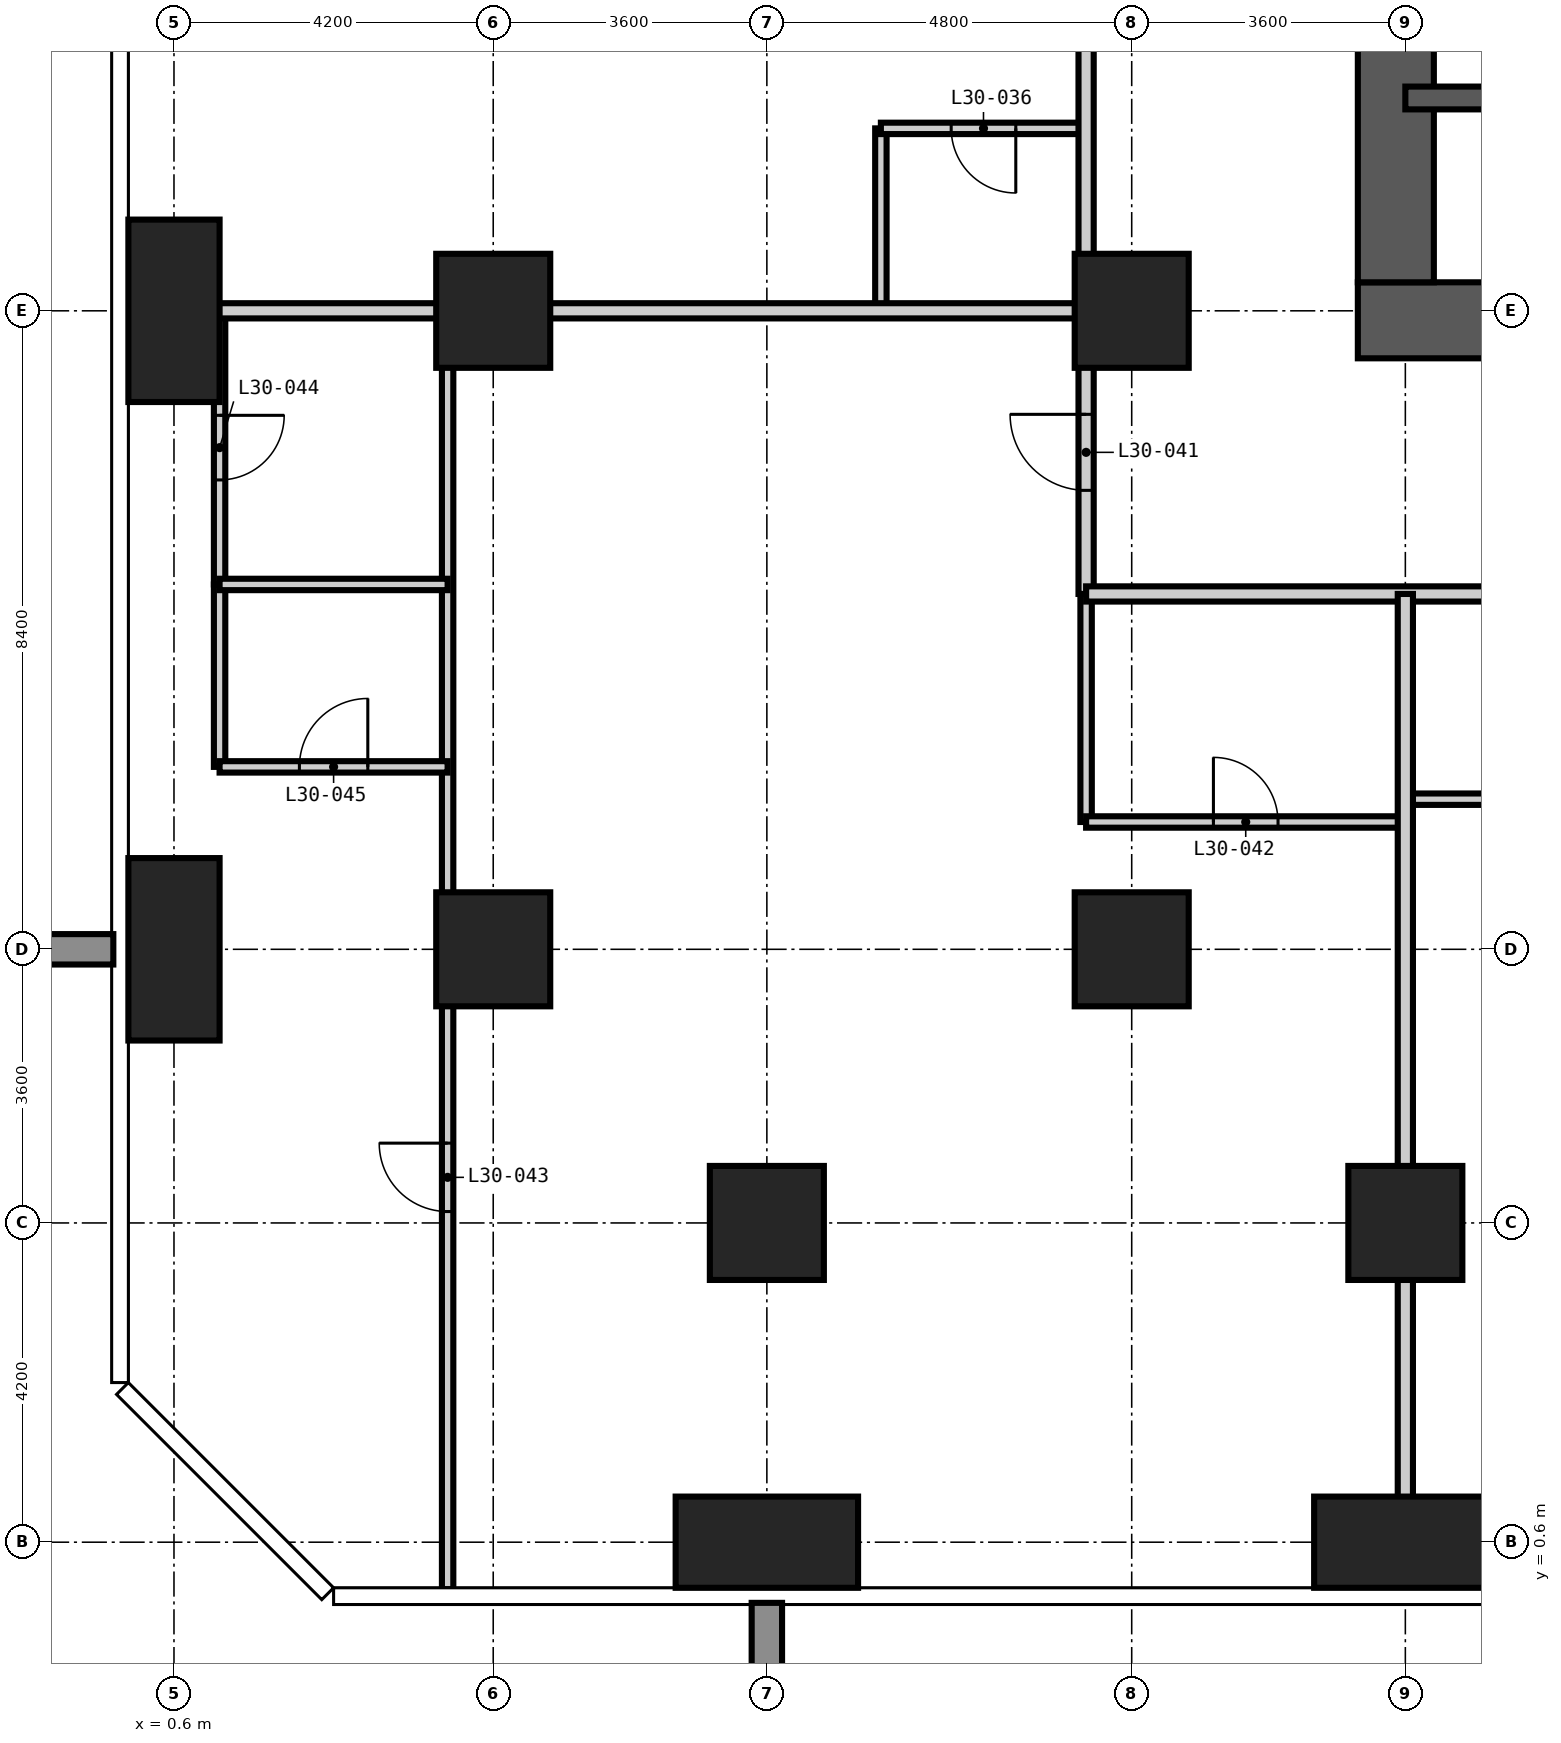
"""IFC4 building model, lengths in metres.
Left out: names, types, materials, properties, quantities, classifications, styles, units other than length and angle.
Written with IfcOpenShell. Run it as: python <this file> out.ifc"""

import sys

from ifc_helpers import new_model, si_unit, direction, frame, frame_2d, origin, origin_2d, place, context, subcontext, project, spatial, rectangle, extrude, element, fill, save


model = new_model("IFC4")
c1 = context("Model", 3, precision=1e-05, world=origin(), true_north=direction((0.0, 1.0)))
c2 = subcontext(c1, "Body", "Model", "MODEL_VIEW")
j1 = project(units=[si_unit("LENGTHUNIT", "METRE"), si_unit("PLANEANGLEUNIT", "RADIAN")], contexts=[c1])
p1 = place(None, origin())
s1 = spatial("IfcSite", under=j1, at=p1, CompositionType="ELEMENT")
p2 = place(p1, origin())
s2 = spatial("IfcBuilding", under=s1, at=p2, CompositionType="ELEMENT")
p3 = place(p2, frame((0.0, 0.0, 118.8)))
s3 = spatial("IfcBuildingStorey", under=s2, at=p3, CompositionType="ELEMENT", Elevation=118.8)
for number, where, z_axis, x_axis in (
    (1, (0.6, 8.4, -0.35), (0.0, 0.0, 1.0), (1.0, 0.0, 0.0)),
    (2, (0.6, 16.8, -0.35), (0.0, 0.0, 1.0), (1.0, 0.0, 0.0)),
):
    element("IfcColumn", number, at=place(p3, frame(where, z_axis=z_axis, x_axis=x_axis)), inside=s3, PredefinedType="COLUMN", context=c2, shape_type="SweptSolid", body=[
        extrude(rectangle(XDim=1.2, YDim=2.4, at=origin_2d()), origin(), (0.0, 0.0, 1.0), 3.6),
    ])
for number, where, z_axis, x_axis in (
    (3, (4.8, 8.4, -0.35), (0.0, 0.0, 1.0), (1.0, 0.0, 0.0)),
    (4, (4.8, 16.8, -0.35), (0.0, 0.0, 1.0), (1.0, 0.0, 0.0)),
):
    element("IfcColumn", number, at=place(p3, frame(where, z_axis=z_axis, x_axis=x_axis)), inside=s3, PredefinedType="COLUMN", context=c2, shape_type="SweptSolid", body=[
        extrude(rectangle(XDim=1.5, YDim=1.5, at=origin_2d()), origin(), (0.0, 0.0, 1.0), 3.6),
    ])
p4 = place(p3, frame((8.4, 0.6, -0.35), z_axis=(0.0, 0.0, 1.0), x_axis=(1.0, 0.0, 0.0)))
e5 = element("IfcColumn", 5, at=p4, inside=s3, PredefinedType="COLUMN", context=c2, shape_type="SweptSolid", body=[
    extrude(rectangle(XDim=2.4, YDim=1.2, at=origin_2d()), origin(), (0.0, 0.0, 1.0), 3.6),
])
for number, where, z_axis, x_axis in (
    (6, (8.4, 4.8, -0.35), (0.0, 0.0, 1.0), (1.0, 0.0, 0.0)),
    (7, (13.2, 8.4, -0.35), (0.0, 0.0, 1.0), (1.0, 0.0, 0.0)),
    (8, (13.2, 16.8, -0.35), (0.0, 0.0, 1.0), (1.0, 0.0, 0.0)),
):
    element("IfcColumn", number, at=place(p3, frame(where, z_axis=z_axis, x_axis=x_axis)), inside=s3, PredefinedType="COLUMN", context=c2, shape_type="SweptSolid", body=[
        extrude(rectangle(XDim=1.5, YDim=1.5, at=origin_2d()), origin(), (0.0, 0.0, 1.0), 3.6),
    ])
p5 = place(p3, frame((16.8, 0.6, -0.35), z_axis=(0.0, 0.0, 1.0), x_axis=(1.0, 0.0, 0.0)))
e9 = element("IfcColumn", 9, at=p5, inside=s3, PredefinedType="COLUMN", context=c2, shape_type="SweptSolid", body=[
    extrude(rectangle(XDim=2.4, YDim=1.2, at=origin_2d()), origin(), (0.0, 0.0, 1.0), 3.6),
])
p6 = place(p3, frame((16.8, 4.8, -0.35), z_axis=(0.0, 0.0, 1.0), x_axis=(1.0, 0.0, 0.0)))
e10 = element("IfcColumn", 10, at=p6, inside=s3, PredefinedType="COLUMN", context=c2, shape_type="SweptSolid", body=[
    extrude(rectangle(XDim=1.5, YDim=1.5, at=origin_2d()), origin(), (0.0, 0.0, 1.0), 3.6),
])
p7 = place(p3, frame((16.175, 16.675, -0.35), z_axis=(0.0, 0.0, 1.0), x_axis=(1.0, 0.0, 0.0)))
e11 = element("IfcWall", 11, at=p7, inside=s3, PredefinedType="SHEAR", context=c2, shape_type="SweptSolid", body=[
    extrude(rectangle(XDim=26.45, YDim=1.0, at=frame_2d((13.225, 0.0))), origin(), (0.0, 0.0, 1.0), 3.6),
])
p8 = place(p7, frame((12.725, 0.0, 0.35)))
e12 = element("IfcOpeningElement", 12, at=p8, cuts=e11, PredefinedType="OPENING", context=c2, shape_type="SweptSolid", body=[
    extrude(rectangle(XDim=1.0, YDim=2.1, at=frame_2d((0.5, 1.05))), frame((0.0, 0.51, 0.0), z_axis=(0.0, -1.0, 0.0), x_axis=(1.0, 0.0, 0.0)), (0.0, 0.0, 1.0), 1.02),
])
p9 = place(p7, frame((19.025, 0.0, 0.35)))
e13 = element("IfcOpeningElement", 13, at=p9, cuts=e11, PredefinedType="OPENING", context=c2, shape_type="SweptSolid", body=[
    extrude(rectangle(XDim=1.0, YDim=2.1, at=frame_2d((0.5, 1.05))), frame((0.0, 0.51, 0.0), z_axis=(0.0, -1.0, 0.0), x_axis=(1.0, 0.0, 0.0)), (0.0, 0.0, 1.0), 1.02),
])
p10 = place(p3, frame((16.675, 41.625, -0.35), z_axis=(0.0, 0.0, 1.0), x_axis=(0.0, -1.0, 0.0)))
e14 = element("IfcWall", 14, at=p10, inside=s3, PredefinedType="SHEAR", context=c2, shape_type="SweptSolid", body=[
    extrude(rectangle(XDim=24.45, YDim=1.0, at=frame_2d((12.225, 0.0))), origin(), (0.0, 0.0, 1.0), 3.6),
])
p11 = place(p10, frame((11.325, 0.0, 0.35)))
e15 = element("IfcOpeningElement", 15, at=p11, cuts=e14, PredefinedType="OPENING", context=c2, shape_type="SweptSolid", body=[
    extrude(rectangle(XDim=1.8, YDim=2.2, at=frame_2d((0.9, 1.1))), frame((0.0, 0.51, 0.0), z_axis=(0.0, -1.0, 0.0), x_axis=(1.0, 0.0, 0.0)), (0.0, 0.0, 1.0), 1.02),
])
p12 = place(p10, frame((20.125, 0.0, 0.35)))
e16 = element("IfcOpeningElement", 16, at=p12, cuts=e14, PredefinedType="OPENING", context=c2, shape_type="SweptSolid", body=[
    extrude(rectangle(XDim=1.0, YDim=2.1, at=frame_2d((0.5, 1.05))), frame((0.0, 0.51, 0.0), z_axis=(0.0, -1.0, 0.0), x_axis=(1.0, 0.0, 0.0)), (0.0, 0.0, 1.0), 1.02),
])
p13 = place(p10, frame((5.425, 0.0, 0.35)))
e17 = element("IfcOpeningElement", 17, at=p13, cuts=e14, PredefinedType="OPENING", context=c2, shape_type="SweptSolid", body=[
    extrude(rectangle(XDim=1.0, YDim=2.1, at=frame_2d((0.5, 1.05))), frame((0.0, 0.51, 0.0), z_axis=(0.0, -1.0, 0.0), x_axis=(1.0, 0.0, 0.0)), (0.0, 0.0, 1.0), 1.02),
])
p14 = place(p3, frame((16.8, 19.6, -0.35), z_axis=(0.0, 0.0, 1.0), x_axis=(1.0, 0.0, 0.0)))
e18 = element("IfcWall", 18, at=p14, inside=s3, PredefinedType="SHEAR", context=c2, shape_type="SweptSolid", body=[
    extrude(rectangle(XDim=8.4, YDim=0.3, at=frame_2d((4.2, 0.0))), origin(), (0.0, 0.0, 1.0), 3.6),
])
p15 = place(p3, frame((1.2, 13.2, 0.0), z_axis=(0.0, 0.0, 1.0), x_axis=(0.0, 1.0, 0.0)))
e19 = element("IfcWall", 19, at=p15, inside=s3, PredefinedType="PARTITIONING", context=c2, shape_type="SweptSolid", body=[
    extrude(rectangle(XDim=3.6, YDim=0.15, at=frame_2d((1.8, 0.0))), origin(), (0.0, 0.0, 1.0), 3.25),
])
p16 = place(p15, frame((1.375, 0.0, 0.0)))
e20 = element("IfcOpeningElement", 20, at=p16, cuts=e19, PredefinedType="OPENING", context=c2, shape_type="SweptSolid", body=[
    extrude(rectangle(XDim=0.85, YDim=2.1, at=frame_2d((0.425, 1.05))), frame((0.0, 0.085, 0.0), z_axis=(0.0, -1.0, 0.0), x_axis=(1.0, 0.0, 0.0)), (0.0, 0.0, 1.0), 0.17),
])
p17 = place(p3, frame((9.9, 16.8, 0.0), z_axis=(0.0, 0.0, 1.0), x_axis=(0.0, 1.0, 0.0)))
e21 = element("IfcWall", 21, at=p17, inside=s3, PredefinedType="PARTITIONING", context=c2, shape_type="SweptSolid", body=[
    extrude(rectangle(XDim=2.4, YDim=0.15, at=frame_2d((1.2, 0.0))), origin(), (0.0, 0.0, 1.0), 3.25),
])
p18 = place(p3, frame((12.6, 10.075, 0.0), z_axis=(0.0, 0.0, 1.0), x_axis=(0.0, 1.0, 0.0)))
e22 = element("IfcWall", 22, at=p18, inside=s3, PredefinedType="PARTITIONING", context=c2, shape_type="SweptSolid", body=[
    extrude(rectangle(XDim=3.0, YDim=0.15, at=frame_2d((1.5, 0.0))), origin(), (0.0, 0.0, 1.0), 3.25),
])
p19 = place(p3, frame((12.6, 10.075, 0.0), z_axis=(0.0, 0.0, 1.0), x_axis=(1.0, 0.0, 0.0)))
e23 = element("IfcWall", 23, at=p19, inside=s3, PredefinedType="PARTITIONING", context=c2, shape_type="SweptSolid", body=[
    extrude(rectangle(XDim=4.2, YDim=0.15, at=frame_2d((2.1, 0.0))), origin(), (0.0, 0.0, 1.0), 3.25),
])
p20 = place(p19, frame((1.675, 0.0, 0.0)))
e24 = element("IfcOpeningElement", 24, at=p20, cuts=e23, PredefinedType="OPENING", context=c2, shape_type="SweptSolid", body=[
    extrude(rectangle(XDim=0.85, YDim=2.1, at=frame_2d((0.425, 1.05))), frame((0.0, 0.085, 0.0), z_axis=(0.0, -1.0, 0.0), x_axis=(1.0, 0.0, 0.0)), (0.0, 0.0, 1.0), 0.17),
])
p21 = place(p3, frame((16.8, 10.375, 0.0), z_axis=(0.0, 0.0, 1.0), x_axis=(1.0, 0.0, 0.0)))
e25 = element("IfcWall", 25, at=p21, inside=s3, PredefinedType="PARTITIONING", context=c2, shape_type="SweptSolid", body=[
    extrude(rectangle(XDim=2.4, YDim=0.15, at=frame_2d((1.2, 0.0))), origin(), (0.0, 0.0, 1.0), 3.25),
])
p22 = place(p3, frame((9.9, 19.2, 0.0), z_axis=(0.0, 0.0, 1.0), x_axis=(1.0, 0.0, 0.0)))
e26 = element("IfcWall", 26, at=p22, inside=s3, PredefinedType="PARTITIONING", context=c2, shape_type="SweptSolid", body=[
    extrude(rectangle(XDim=2.7, YDim=0.15, at=frame_2d((1.35, 0.0))), origin(), (0.0, 0.0, 1.0), 3.25),
])
p23 = place(p22, frame((0.925, 0.0, 0.0)))
e27 = element("IfcOpeningElement", 27, at=p23, cuts=e26, PredefinedType="OPENING", context=c2, shape_type="SweptSolid", body=[
    extrude(rectangle(XDim=0.85, YDim=2.1, at=frame_2d((0.425, 1.05))), frame((0.0, 0.085, 0.0), z_axis=(0.0, -1.0, 0.0), x_axis=(1.0, 0.0, 0.0)), (0.0, 0.0, 1.0), 0.17),
])
p24 = place(p3, frame((12.6, 13.075, 0.0), z_axis=(0.0, 0.0, 1.0), x_axis=(0.0, 1.0, 0.0)))
e28 = element("IfcWall", 28, at=p24, inside=s3, PredefinedType="PARTITIONING", context=c2, shape_type="SweptSolid", body=[
    extrude(rectangle(XDim=31.45, YDim=0.2, at=frame_2d((15.725, 0.0))), origin(), (0.0, 0.0, 1.0), 3.25),
])
p25 = place(p24, frame((8.625, 0.0, 0.0)))
e29 = element("IfcOpeningElement", 29, at=p25, cuts=e28, PredefinedType="OPENING", context=c2, shape_type="SweptSolid", body=[
    extrude(rectangle(XDim=1.0, YDim=2.2, at=frame_2d((0.5, 1.1))), frame((0.0, 0.11, 0.0), z_axis=(0.0, -1.0, 0.0), x_axis=(1.0, 0.0, 0.0)), (0.0, 0.0, 1.0), 0.22),
])
p26 = place(p24, frame((17.025, 0.0, 0.0)))
e30 = element("IfcOpeningElement", 30, at=p26, cuts=e28, PredefinedType="OPENING", context=c2, shape_type="SweptSolid", body=[
    extrude(rectangle(XDim=1.0, YDim=2.2, at=frame_2d((0.5, 1.1))), frame((0.0, 0.11, 0.0), z_axis=(0.0, -1.0, 0.0), x_axis=(1.0, 0.0, 0.0)), (0.0, 0.0, 1.0), 0.22),
])
p27 = place(p24, frame((25.425, 0.0, 0.0)))
e31 = element("IfcOpeningElement", 31, at=p27, cuts=e28, PredefinedType="OPENING", context=c2, shape_type="SweptSolid", body=[
    extrude(rectangle(XDim=1.0, YDim=2.2, at=frame_2d((0.5, 1.1))), frame((0.0, 0.11, 0.0), z_axis=(0.0, -1.0, 0.0), x_axis=(1.0, 0.0, 0.0)), (0.0, 0.0, 1.0), 0.22),
])
p28 = place(p24, frame((1.363, 0.0, 0.0)))
e32 = element("IfcOpeningElement", 32, at=p28, cuts=e28, PredefinedType="OPENING", context=c2, shape_type="SweptSolid", body=[
    extrude(rectangle(XDim=1.0, YDim=2.2, at=frame_2d((0.5, 1.1))), frame((0.0, 0.11, 0.0), z_axis=(0.0, -1.0, 0.0), x_axis=(1.0, 0.0, 0.0)), (0.0, 0.0, 1.0), 0.22),
])
p29 = place(p24, frame((29.788, 0.0, 0.0)))
e33 = element("IfcOpeningElement", 33, at=p29, cuts=e28, PredefinedType="OPENING", context=c2, shape_type="SweptSolid", body=[
    extrude(rectangle(XDim=1.0, YDim=2.2, at=frame_2d((0.5, 1.1))), frame((0.0, 0.11, 0.0), z_axis=(0.0, -1.0, 0.0), x_axis=(1.0, 0.0, 0.0)), (0.0, 0.0, 1.0), 0.22),
])
p30 = place(p3, frame((45.125, 13.075, 0.0), z_axis=(0.0, 0.0, 1.0), x_axis=(-1.0, 0.0, 0.0)))
e34 = element("IfcWall", 34, at=p30, inside=s3, PredefinedType="PARTITIONING", context=c2, shape_type="SweptSolid", body=[
    extrude(rectangle(XDim=32.525, YDim=0.2, at=frame_2d((16.262, 0.0))), origin(), (0.0, 0.0, 1.0), 3.25),
])
p31 = place(p30, frame((22.425, 0.0, 0.0)))
e35 = element("IfcOpeningElement", 35, at=p31, cuts=e34, PredefinedType="OPENING", context=c2, shape_type="SweptSolid", body=[
    extrude(rectangle(XDim=1.0, YDim=2.2, at=frame_2d((0.5, 1.1))), frame((0.0, 0.11, 0.0), z_axis=(0.0, -1.0, 0.0), x_axis=(1.0, 0.0, 0.0)), (0.0, 0.0, 1.0), 0.22),
])
p32 = place(p30, frame((14.025, 0.0, 0.0)))
e36 = element("IfcOpeningElement", 36, at=p32, cuts=e34, PredefinedType="OPENING", context=c2, shape_type="SweptSolid", body=[
    extrude(rectangle(XDim=1.0, YDim=2.2, at=frame_2d((0.5, 1.1))), frame((0.0, 0.11, 0.0), z_axis=(0.0, -1.0, 0.0), x_axis=(1.0, 0.0, 0.0)), (0.0, 0.0, 1.0), 0.22),
])
p33 = place(p30, frame((5.625, 0.0, 0.0)))
e37 = element("IfcOpeningElement", 37, at=p33, cuts=e34, PredefinedType="OPENING", context=c2, shape_type="SweptSolid", body=[
    extrude(rectangle(XDim=1.0, YDim=2.2, at=frame_2d((0.5, 1.1))), frame((0.0, 0.11, 0.0), z_axis=(0.0, -1.0, 0.0), x_axis=(1.0, 0.0, 0.0)), (0.0, 0.0, 1.0), 0.22),
])
p34 = place(p3, frame((16.8, -0.018, 0.0), z_axis=(0.0, 0.0, 1.0), x_axis=(0.0, 1.0, 0.0)))
e38 = element("IfcWall", 38, at=p34, inside=s3, PredefinedType="PARTITIONING", context=c2, shape_type="SweptSolid", body=[
    extrude(rectangle(XDim=13.093, YDim=0.2, at=frame_2d((6.546, 0.0))), origin(), (0.0, 0.0, 1.0), 3.25),
])
p35 = place(p3, frame((-0.018, 16.8, 0.0), z_axis=(0.0, 0.0, 1.0), x_axis=(1.0, 0.0, 0.0)))
e39 = element("IfcWall", 39, at=p35, inside=s3, PredefinedType="PARTITIONING", context=c2, shape_type="SweptSolid", body=[
    extrude(rectangle(XDim=12.618, YDim=0.2, at=frame_2d((6.309, 0.0))), origin(), (0.0, 0.0, 1.0), 3.25),
])
p36 = place(p3, frame((1.2, 10.8, 0.0), z_axis=(0.0, 0.0, 1.0), x_axis=(0.0, 1.0, 0.0)))
e40 = element("IfcWall", 40, at=p36, inside=s3, PredefinedType="PARTITIONING", context=c2, shape_type="SweptSolid", body=[
    extrude(rectangle(XDim=2.4, YDim=0.15, at=frame_2d((1.2, 0.0))), origin(), (0.0, 0.0, 1.0), 3.25),
])
p37 = place(p3, frame((4.2, -0.018, 0.0), z_axis=(0.0, 0.0, 1.0), x_axis=(0.0, 1.0, 0.0)))
e41 = element("IfcWall", 41, at=p37, inside=s3, PredefinedType="PARTITIONING", context=c2, shape_type="SweptSolid", body=[
    extrude(rectangle(XDim=16.818, YDim=0.15, at=frame_2d((8.409, 0.0))), origin(), (0.0, 0.0, 1.0), 3.25),
])
p38 = place(p37, frame((4.968, 0.0, 0.0)))
e42 = element("IfcOpeningElement", 42, at=p38, cuts=e41, PredefinedType="OPENING", context=c2, shape_type="SweptSolid", body=[
    extrude(rectangle(XDim=0.9, YDim=2.1, at=frame_2d((0.45, 1.05))), frame((0.0, 0.085, 0.0), z_axis=(0.0, -1.0, 0.0), x_axis=(1.0, 0.0, 0.0)), (0.0, 0.0, 1.0), 0.17),
])
p39 = place(p3, frame((1.2, 10.8, 0.0), z_axis=(0.0, 0.0, 1.0), x_axis=(1.0, 0.0, 0.0)))
e43 = element("IfcWall", 43, at=p39, inside=s3, PredefinedType="PARTITIONING", context=c2, shape_type="SweptSolid", body=[
    extrude(rectangle(XDim=3.0, YDim=0.15, at=frame_2d((1.5, 0.0))), origin(), (0.0, 0.0, 1.0), 3.25),
])
p40 = place(p39, frame((1.05, 0.0, 0.0)))
e44 = element("IfcOpeningElement", 44, at=p40, cuts=e43, PredefinedType="OPENING", context=c2, shape_type="SweptSolid", body=[
    extrude(rectangle(XDim=0.9, YDim=2.1, at=frame_2d((0.45, 1.05))), frame((0.0, 0.085, 0.0), z_axis=(0.0, -1.0, 0.0), x_axis=(1.0, 0.0, 0.0)), (0.0, 0.0, 1.0), 0.17),
])
p41 = place(p3, frame((1.2, 13.2, 0.0), z_axis=(0.0, 0.0, 1.0), x_axis=(1.0, 0.0, 0.0)))
e45 = element("IfcWall", 45, at=p41, inside=s3, PredefinedType="PARTITIONING", context=c2, shape_type="SweptSolid", body=[
    extrude(rectangle(XDim=3.0, YDim=0.15, at=frame_2d((1.5, 0.0))), origin(), (0.0, 0.0, 1.0), 3.25),
])
p42 = place(p23, frame((0.85, 0.0, 0.0), z_axis=(0.0, 0.0, 1.0), x_axis=(-1.0, 0.0, 0.0)))
e46 = element("IfcDoor", 46, at=p42, inside=s3, OperationType="SINGLE_SWING_LEFT", PredefinedType="DOOR", context=c2, shape_type="SweptSolid", body=[
    extrude(rectangle(XDim=0.85, YDim=2.1, at=frame_2d((0.425, 1.05))), frame((0.0, 0.025, 0.0), z_axis=(0.0, -1.0, 0.0), x_axis=(1.0, 0.0, 0.0)), (0.0, 0.0, 1.0), 0.05),
])
fill(e27, e46)
p43 = place(p28, origin())
e47 = element("IfcDoor", 47, at=p43, inside=s3, OperationType="SINGLE_SWING_RIGHT", PredefinedType="DOOR", context=c2, shape_type="SweptSolid", body=[
    extrude(rectangle(XDim=1.0, YDim=2.2, at=frame_2d((0.5, 1.1))), frame((0.0, 0.025, 0.0), z_axis=(0.0, -1.0, 0.0), x_axis=(1.0, 0.0, 0.0)), (0.0, 0.0, 1.0), 0.05),
])
fill(e32, e47)
p44 = place(p20, origin())
e48 = element("IfcDoor", 48, at=p44, inside=s3, OperationType="SINGLE_SWING_LEFT", PredefinedType="DOOR", context=c2, shape_type="SweptSolid", body=[
    extrude(rectangle(XDim=0.85, YDim=2.1, at=frame_2d((0.425, 1.05))), frame((0.0, 0.025, 0.0), z_axis=(0.0, -1.0, 0.0), x_axis=(1.0, 0.0, 0.0)), (0.0, 0.0, 1.0), 0.05),
])
fill(e24, e48)
p45 = place(p38, origin())
e49 = element("IfcDoor", 49, at=p45, inside=s3, OperationType="SINGLE_SWING_RIGHT", PredefinedType="DOOR", context=c2, shape_type="SweptSolid", body=[
    extrude(rectangle(XDim=0.9, YDim=2.1, at=frame_2d((0.45, 1.05))), frame((0.0, 0.025, 0.0), z_axis=(0.0, -1.0, 0.0), x_axis=(1.0, 0.0, 0.0)), (0.0, 0.0, 1.0), 0.05),
])
fill(e42, e49)
p46 = place(p16, frame((0.85, 0.0, 0.0), z_axis=(0.0, 0.0, 1.0), x_axis=(-1.0, 0.0, 0.0)))
e50 = element("IfcDoor", 50, at=p46, inside=s3, OperationType="SINGLE_SWING_LEFT", PredefinedType="DOOR", context=c2, shape_type="SweptSolid", body=[
    extrude(rectangle(XDim=0.85, YDim=2.1, at=frame_2d((0.425, 1.05))), frame((0.0, 0.025, 0.0), z_axis=(0.0, -1.0, 0.0), x_axis=(1.0, 0.0, 0.0)), (0.0, 0.0, 1.0), 0.05),
])
fill(e20, e50)
p47 = place(p40, origin())
e51 = element("IfcDoor", 51, at=p47, inside=s3, OperationType="SINGLE_SWING_RIGHT", PredefinedType="DOOR", context=c2, shape_type="SweptSolid", body=[
    extrude(rectangle(XDim=0.9, YDim=2.1, at=frame_2d((0.45, 1.05))), frame((0.0, 0.025, 0.0), z_axis=(0.0, -1.0, 0.0), x_axis=(1.0, 0.0, 0.0)), (0.0, 0.0, 1.0), 0.05),
])
fill(e44, e51)
save(model, sys.argv[1])
